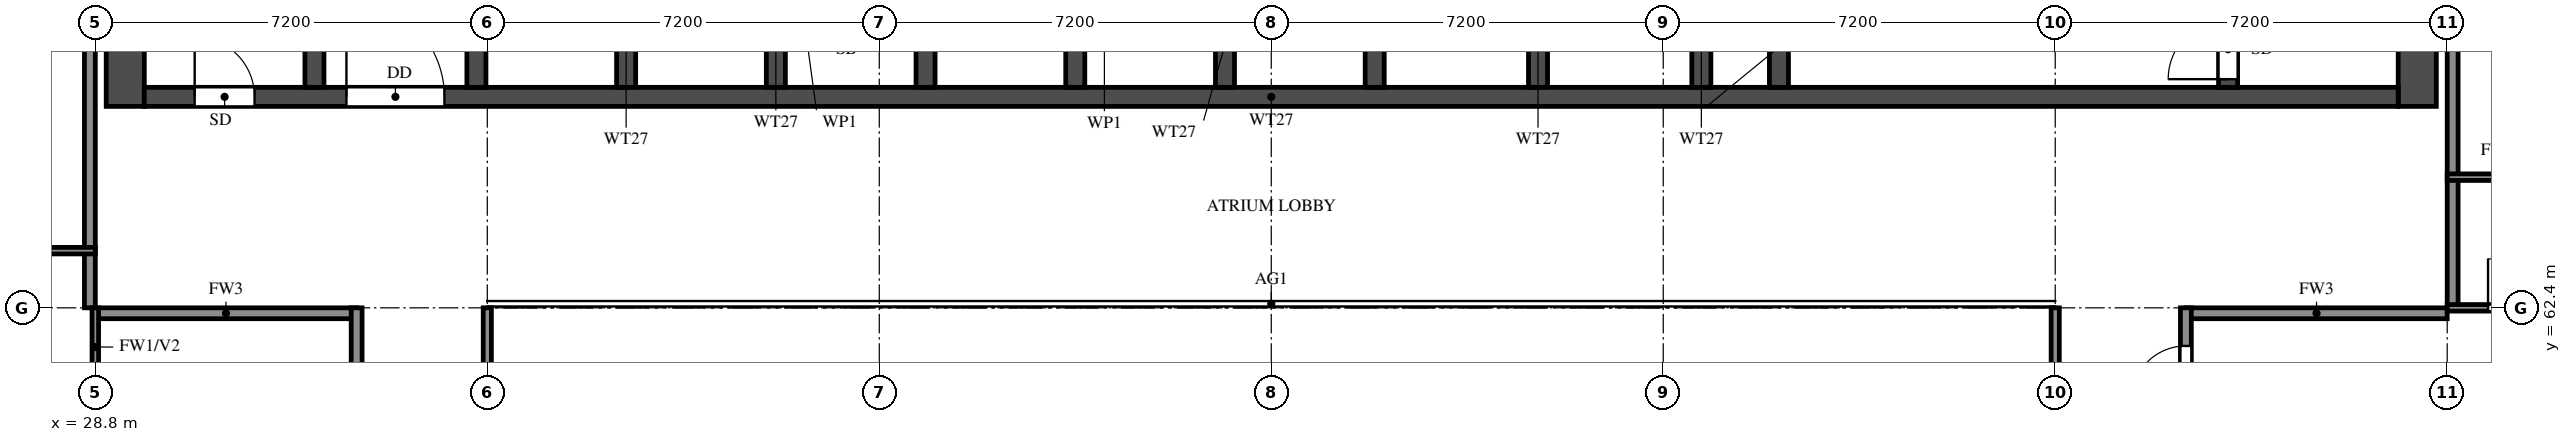
"""IFC4 building model, lengths in metres.
Left out: names, types, materials, properties, quantities, classifications, styles, units other than length and angle.
Written with IfcOpenShell. Run it as: python <this file> out.ifc"""

import sys

from ifc_helpers import new_model, si_unit, direction, frame, frame_2d, origin, place, context, subcontext, project, spatial, rectangle, extrude, element, fill, save


model = new_model("IFC4")
c1 = context("Model", 3, precision=1e-05, world=origin(), true_north=direction((0.0, 1.0)))
c2 = subcontext(c1, "Body", "Model", "MODEL_VIEW")
j1 = project(units=[si_unit("LENGTHUNIT", "METRE"), si_unit("PLANEANGLEUNIT", "RADIAN")], contexts=[c1])
p1 = place(None, origin())
s1 = spatial("IfcSite", under=j1, at=p1, CompositionType="ELEMENT")
p2 = place(p1, origin())
s2 = spatial("IfcBuilding", under=s1, at=p2, CompositionType="ELEMENT")
p3 = place(p2, frame((0.0, 0.0, 157.0)))
s3 = spatial("IfcBuildingStorey", under=s2, at=p3, CompositionType="ELEMENT", Elevation=157.0)
for number, where, z_axis, x_axis in (
    (1, (29.35, 66.1, 0.0), (0.0, 0.0, 1.0), (0.0, 1.0, 0.0)),
    (2, (71.45, 66.1, 0.0), (0.0, 0.0, 1.0), (0.0, 1.0, 0.0)),
):
    element("IfcWall", number, at=place(p3, frame(where, z_axis=z_axis, x_axis=x_axis)), inside=s3, PredefinedType="SHEAR", context=c2, shape_type="SweptSolid", body=[
        extrude(rectangle(XDim=11.9, YDim=0.7, at=frame_2d((5.95, 0.0))), origin(), (0.0, 0.0, 1.0), 3.2),
    ])
p4 = place(p3, frame((29.7, 66.275, 0.0), z_axis=(0.0, 0.0, 1.0), x_axis=(1.0, 0.0, 0.0)))
e3 = element("IfcWall", 3, at=p4, inside=s3, PredefinedType="SHEAR", context=c2, shape_type="SweptSolid", body=[
    extrude(rectangle(XDim=41.4, YDim=0.35, at=frame_2d((20.7, 0.0))), origin(), (0.0, 0.0, 1.0), 3.2),
])
p5 = place(p4, frame((0.925, 0.0, 0.0)))
e4 = element("IfcOpeningElement", 4, at=p5, cuts=e3, PredefinedType="OPENING", context=c2, shape_type="SweptSolid", body=[
    extrude(rectangle(XDim=1.1, YDim=2.1, at=frame_2d((0.55, 1.05))), frame((0.0, 0.185, 0.0), z_axis=(0.0, -1.0, 0.0), x_axis=(1.0, 0.0, 0.0)), (0.0, 0.0, 1.0), 0.37),
])
p6 = place(p4, frame((3.712, 0.0, 0.0)))
e5 = element("IfcOpeningElement", 5, at=p6, cuts=e3, PredefinedType="OPENING", context=c2, shape_type="SweptSolid", body=[
    extrude(rectangle(XDim=1.8, YDim=2.1, at=frame_2d((0.9, 1.05))), frame((0.0, 0.185, 0.0), z_axis=(0.0, -1.0, 0.0), x_axis=(1.0, 0.0, 0.0)), (0.0, 0.0, 1.0), 0.37),
])
p7 = place(p3, frame((32.825, 66.45, 0.0), z_axis=(0.0, 0.0, 1.0), x_axis=(0.0, 1.0, 0.0)))
e6 = element("IfcWall", 6, at=p7, inside=s3, PredefinedType="SHEAR", context=c2, shape_type="SweptSolid", body=[
    extrude(rectangle(XDim=10.85, YDim=0.35, at=frame_2d((5.425, 0.0))), origin(), (0.0, 0.0, 1.0), 3.2),
])
p8 = place(p3, frame((67.975, 66.45, 0.0), z_axis=(0.0, 0.0, 1.0), x_axis=(0.0, 1.0, 0.0)))
e7 = element("IfcWall", 7, at=p8, inside=s3, PredefinedType="SHEAR", context=c2, shape_type="SweptSolid", body=[
    extrude(rectangle(XDim=10.85, YDim=0.35, at=frame_2d((5.425, 0.0))), origin(), (0.0, 0.0, 1.0), 3.2),
])
p9 = place(p8, frame((0.15, 0.0, 0.0)))
e8 = element("IfcOpeningElement", 8, at=p9, cuts=e7, PredefinedType="OPENING", context=c2, shape_type="SweptSolid", body=[
    extrude(rectangle(XDim=1.1, YDim=2.1, at=frame_2d((0.55, 1.05))), frame((0.0, 0.185, 0.0), z_axis=(0.0, -1.0, 0.0), x_axis=(1.0, 0.0, 0.0)), (0.0, 0.0, 1.0), 0.37),
])
p10 = place(p3, frame((59.725, 66.45, 0.0), z_axis=(0.0, 0.0, 1.0), x_axis=(0.0, 1.0, 0.0)))
e9 = element("IfcWall", 9, at=p10, inside=s3, PredefinedType="SHEAR", context=c2, shape_type="SweptSolid", body=[
    extrude(rectangle(XDim=6.125, YDim=0.35, at=frame_2d((3.062, 0.0))), origin(), (0.0, 0.0, 1.0), 3.2),
])
p11 = place(p10, frame((3.85, 0.0, 0.0)))
e10 = element("IfcOpeningElement", 10, at=p11, cuts=e9, PredefinedType="OPENING", context=c2, shape_type="SweptSolid", body=[
    extrude(rectangle(XDim=1.2, YDim=2.1, at=frame_2d((0.6, 1.05))), frame((0.0, 0.185, 0.0), z_axis=(0.0, -1.0, 0.0), x_axis=(1.0, 0.0, 0.0)), (0.0, 0.0, 1.0), 0.37),
])
for number, where, z_axis, x_axis in (
    (11, (35.8, 66.45, 0.0), (0.0, 0.0, 1.0), (0.0, 1.0, 0.0)),
    (12, (38.55, 66.45, 0.0), (0.0, 0.0, 1.0), (0.0, 1.0, 0.0)),
    (13, (41.3, 66.45, 0.0), (0.0, 0.0, 1.0), (0.0, 1.0, 0.0)),
    (14, (44.05, 66.45, 0.0), (0.0, 0.0, 1.0), (0.0, 1.0, 0.0)),
    (15, (46.8, 66.45, 0.0), (0.0, 0.0, 1.0), (0.0, 1.0, 0.0)),
    (16, (49.55, 66.45, 0.0), (0.0, 0.0, 1.0), (0.0, 1.0, 0.0)),
    (17, (52.3, 66.45, 0.0), (0.0, 0.0, 1.0), (0.0, 1.0, 0.0)),
    (18, (55.3, 66.45, 0.0), (0.0, 0.0, 1.0), (0.0, 1.0, 0.0)),
    (19, (58.3, 66.45, 0.0), (0.0, 0.0, 1.0), (0.0, 1.0, 0.0)),
):
    element("IfcWall", number, at=place(p3, frame(where, z_axis=z_axis, x_axis=x_axis)), inside=s3, PredefinedType="SHEAR", context=c2, shape_type="SweptSolid", body=[
        extrude(rectangle(XDim=2.425, YDim=0.35, at=frame_2d((1.212, 0.0))), origin(), (0.0, 0.0, 1.0), 3.2),
    ])
for number, where, z_axis, x_axis in (
    (20, (28.8, 62.3, 0.0), (0.0, 0.0, 1.0), (1.0, 0.0, 0.0)),
    (21, (67.2, 62.3, 0.0), (0.0, 0.0, 1.0), (1.0, 0.0, 0.0)),
):
    element("IfcWall", number, at=place(p3, frame(where, z_axis=z_axis, x_axis=x_axis)), inside=s3, PredefinedType="SOLIDWALL", context=c2, shape_type="SweptSolid", body=[
        extrude(rectangle(XDim=4.8, YDim=0.2, at=frame_2d((2.4, 0.0))), origin(), (0.0, 0.0, 1.0), 3.2),
    ])
p12 = place(p3, frame((28.7, 62.4, 0.0), z_axis=(0.0, 0.0, 1.0), x_axis=(0.0, 1.0, 0.0)))
e22 = element("IfcWall", 22, at=p12, inside=s3, PredefinedType="SOLIDWALL", context=c2, shape_type="SweptSolid", body=[
    extrude(rectangle(XDim=15.6, YDim=0.2, at=frame_2d((7.8, 0.0))), origin(), (0.0, 0.0, 1.0), 3.2),
])
p13 = place(p3, frame((33.6, 50.4, 0.0), z_axis=(0.0, 0.0, 1.0), x_axis=(0.0, 1.0, 0.0)))
e23 = element("IfcWall", 23, at=p13, inside=s3, PredefinedType="SOLIDWALL", context=c2, shape_type="SweptSolid", body=[
    extrude(rectangle(XDim=12.0, YDim=0.2, at=frame_2d((6.0, 0.0))), origin(), (0.0, 0.0, 1.0), 3.2),
])
p14 = place(p13, frame((0.7, 0.0, 0.0)))
e24 = element("IfcOpeningElement", 24, at=p14, cuts=e23, PredefinedType="OPENING", context=c2, shape_type="SweptSolid", body=[
    extrude(rectangle(XDim=1.0, YDim=2.1, at=frame_2d((0.5, 1.05))), frame((0.0, 0.11, 0.0), z_axis=(0.0, -1.0, 0.0), x_axis=(1.0, 0.0, 0.0)), (0.0, 0.0, 1.0), 0.22),
])
p15 = place(p13, frame((9.7, 0.0, 0.0)))
e25 = element("IfcOpeningElement", 25, at=p15, cuts=e23, PredefinedType="OPENING", context=c2, shape_type="SweptSolid", body=[
    extrude(rectangle(XDim=1.0, YDim=2.1, at=frame_2d((0.5, 1.05))), frame((0.0, 0.11, 0.0), z_axis=(0.0, -1.0, 0.0), x_axis=(1.0, 0.0, 0.0)), (0.0, 0.0, 1.0), 0.22),
])
p16 = place(p3, frame((67.2, 60.0, 0.0), z_axis=(0.0, 0.0, 1.0), x_axis=(0.0, 1.0, 0.0)))
e26 = element("IfcWall", 26, at=p16, inside=s3, PredefinedType="SOLIDWALL", context=c2, shape_type="SweptSolid", body=[
    extrude(rectangle(XDim=2.4, YDim=0.2, at=frame_2d((1.2, 0.0))), origin(), (0.0, 0.0, 1.0), 3.2),
])
p17 = place(p16, frame((0.7, 0.0, 0.0)))
e27 = element("IfcOpeningElement", 27, at=p17, cuts=e26, PredefinedType="OPENING", context=c2, shape_type="SweptSolid", body=[
    extrude(rectangle(XDim=1.0, YDim=2.1, at=frame_2d((0.5, 1.05))), frame((0.0, 0.11, 0.0), z_axis=(0.0, -1.0, 0.0), x_axis=(1.0, 0.0, 0.0)), (0.0, 0.0, 1.0), 0.22),
])
p18 = place(p3, frame((72.1, 62.4, 0.0), z_axis=(0.0, 0.0, 1.0), x_axis=(0.0, 1.0, 0.0)))
e28 = element("IfcWall", 28, at=p18, inside=s3, PredefinedType="SOLIDWALL", context=c2, shape_type="SweptSolid", body=[
    extrude(rectangle(XDim=15.6, YDim=0.2, at=frame_2d((7.8, 0.0))), origin(), (0.0, 0.0, 1.0), 3.2),
])
p19 = place(p3, frame((72.0, 62.4, 0.0), z_axis=(0.0, 0.0, 1.0), x_axis=(1.0, 0.0, 0.0)))
e29 = element("IfcWall", 29, at=p19, inside=s3, PredefinedType="PARTITIONING", context=c2, shape_type="SweptSolid", body=[
    extrude(rectangle(XDim=2.4, YDim=0.12, at=frame_2d((1.2, 0.0))), origin(), (0.0, 0.0, 1.0), 3.2),
])
p20 = place(p19, frame((0.75, 0.0, 0.0)))
e30 = element("IfcOpeningElement", 30, at=p20, cuts=e29, PredefinedType="OPENING", context=c2, shape_type="SweptSolid", body=[
    extrude(rectangle(XDim=0.9, YDim=2.1, at=frame_2d((0.45, 1.05))), frame((0.0, 0.07, 0.0), z_axis=(0.0, -1.0, 0.0), x_axis=(1.0, 0.0, 0.0)), (0.0, 0.0, 1.0), 0.14),
])
p21 = place(p3, frame((23.7, 63.45, 0.0), z_axis=(0.0, 0.0, 1.0), x_axis=(1.0, 0.0, 0.0)))
e31 = element("IfcWall", 31, at=p21, inside=s3, PredefinedType="PARTITIONING", context=c2, shape_type="SweptSolid", body=[
    extrude(rectangle(XDim=5.1, YDim=0.12, at=frame_2d((2.55, 0.0))), origin(), (0.0, 0.0, 1.0), 3.2),
])
p22 = place(p3, frame((72.0, 64.8, 0.0), z_axis=(0.0, 0.0, 1.0), x_axis=(1.0, 0.0, 0.0)))
e32 = element("IfcWall", 32, at=p22, inside=s3, PredefinedType="PARTITIONING", context=c2, shape_type="SweptSolid", body=[
    extrude(rectangle(XDim=5.1, YDim=0.12, at=frame_2d((2.55, 0.0))), origin(), (0.0, 0.0, 1.0), 3.2),
])
p23 = place(p22, frame((2.1, 0.0, 0.0)))
e33 = element("IfcOpeningElement", 33, at=p23, cuts=e32, PredefinedType="OPENING", context=c2, shape_type="SweptSolid", body=[
    extrude(rectangle(XDim=0.9, YDim=2.1, at=frame_2d((0.45, 1.05))), frame((0.0, 0.07, 0.0), z_axis=(0.0, -1.0, 0.0), x_axis=(1.0, 0.0, 0.0)), (0.0, 0.0, 1.0), 0.14),
])
p24 = place(p3, frame((28.8, 58.8, 0.0), z_axis=(0.0, 0.0, 1.0), x_axis=(0.0, 1.0, 0.0)))
e34 = element("IfcWall", 34, at=p24, inside=s3, PredefinedType="PARTITIONING", context=c2, shape_type="SweptSolid", body=[
    extrude(rectangle(XDim=3.6, YDim=0.12, at=frame_2d((1.8, 0.0))), origin(), (0.0, 0.0, 1.0), 3.2),
])
p25 = place(p24, frame((0.75, 0.0, 0.0)))
e35 = element("IfcOpeningElement", 35, at=p25, cuts=e34, PredefinedType="OPENING", context=c2, shape_type="SweptSolid", body=[
    extrude(rectangle(XDim=0.9, YDim=2.1, at=frame_2d((0.45, 1.05))), frame((0.0, 0.07, 0.0), z_axis=(0.0, -1.0, 0.0), x_axis=(1.0, 0.0, 0.0)), (0.0, 0.0, 1.0), 0.14),
])
for number, where, z_axis, x_axis in (
    (36, (36.0, 48.0, 0.0), (0.0, 0.0, 1.0), (0.0, 1.0, 0.0)),
    (37, (64.8, 48.0, 0.0), (0.0, 0.0, 1.0), (0.0, 1.0, 0.0)),
):
    element("IfcWall", number, at=place(p3, frame(where, z_axis=z_axis, x_axis=x_axis)), inside=s3, PredefinedType="SOLIDWALL", context=c2, shape_type="SweptSolid", body=[
        extrude(rectangle(XDim=14.4, YDim=0.15, at=frame_2d((7.2, 0.0))), origin(), (0.0, 0.0, 1.0), 2.3),
    ])
p26 = place(p5, origin())
e38 = element("IfcDoor", 38, at=p26, inside=s3, OperationType="SINGLE_SWING_LEFT", PredefinedType="DOOR", context=c2, shape_type="SweptSolid", body=[
    extrude(rectangle(XDim=1.1, YDim=2.1, at=frame_2d((0.55, 1.05))), frame((0.0, 0.025, 0.0), z_axis=(0.0, -1.0, 0.0), x_axis=(1.0, 0.0, 0.0)), (0.0, 0.0, 1.0), 0.05),
])
fill(e4, e38)
p27 = place(p9, origin())
e39 = element("IfcDoor", 39, at=p27, inside=s3, OperationType="SINGLE_SWING_LEFT", PredefinedType="DOOR", context=c2, shape_type="SweptSolid", body=[
    extrude(rectangle(XDim=1.1, YDim=2.1, at=frame_2d((0.55, 1.05))), frame((0.0, 0.025, 0.0), z_axis=(0.0, -1.0, 0.0), x_axis=(1.0, 0.0, 0.0)), (0.0, 0.0, 1.0), 0.05),
])
fill(e8, e39)
p28 = place(p6, origin())
e40 = element("IfcDoor", 40, at=p28, inside=s3, OperationType="DOUBLE_DOOR_SINGLE_SWING", PredefinedType="DOOR", context=c2, shape_type="SweptSolid", body=[
    extrude(rectangle(XDim=1.8, YDim=2.1, at=frame_2d((0.9, 1.05))), frame((0.0, 0.025, 0.0), z_axis=(0.0, -1.0, 0.0), x_axis=(1.0, 0.0, 0.0)), (0.0, 0.0, 1.0), 0.05),
])
fill(e5, e40)
p29 = place(p20, origin())
e41 = element("IfcDoor", 41, at=p29, inside=s3, OperationType="SINGLE_SWING_LEFT", PredefinedType="DOOR", context=c2, shape_type="SweptSolid", body=[
    extrude(rectangle(XDim=0.9, YDim=2.1, at=frame_2d((0.45, 1.05))), frame((0.0, 0.025, 0.0), z_axis=(0.0, -1.0, 0.0), x_axis=(1.0, 0.0, 0.0)), (0.0, 0.0, 1.0), 0.05),
])
fill(e30, e41)
p30 = place(p17, origin())
e42 = element("IfcDoor", 42, at=p30, inside=s3, OperationType="SINGLE_SWING_RIGHT", PredefinedType="DOOR", context=c2, shape_type="SweptSolid", body=[
    extrude(rectangle(XDim=1.0, YDim=2.1, at=frame_2d((0.5, 1.05))), frame((0.0, 0.025, 0.0), z_axis=(0.0, -1.0, 0.0), x_axis=(1.0, 0.0, 0.0)), (0.0, 0.0, 1.0), 0.05),
])
fill(e27, e42)
save(model, sys.argv[1])
